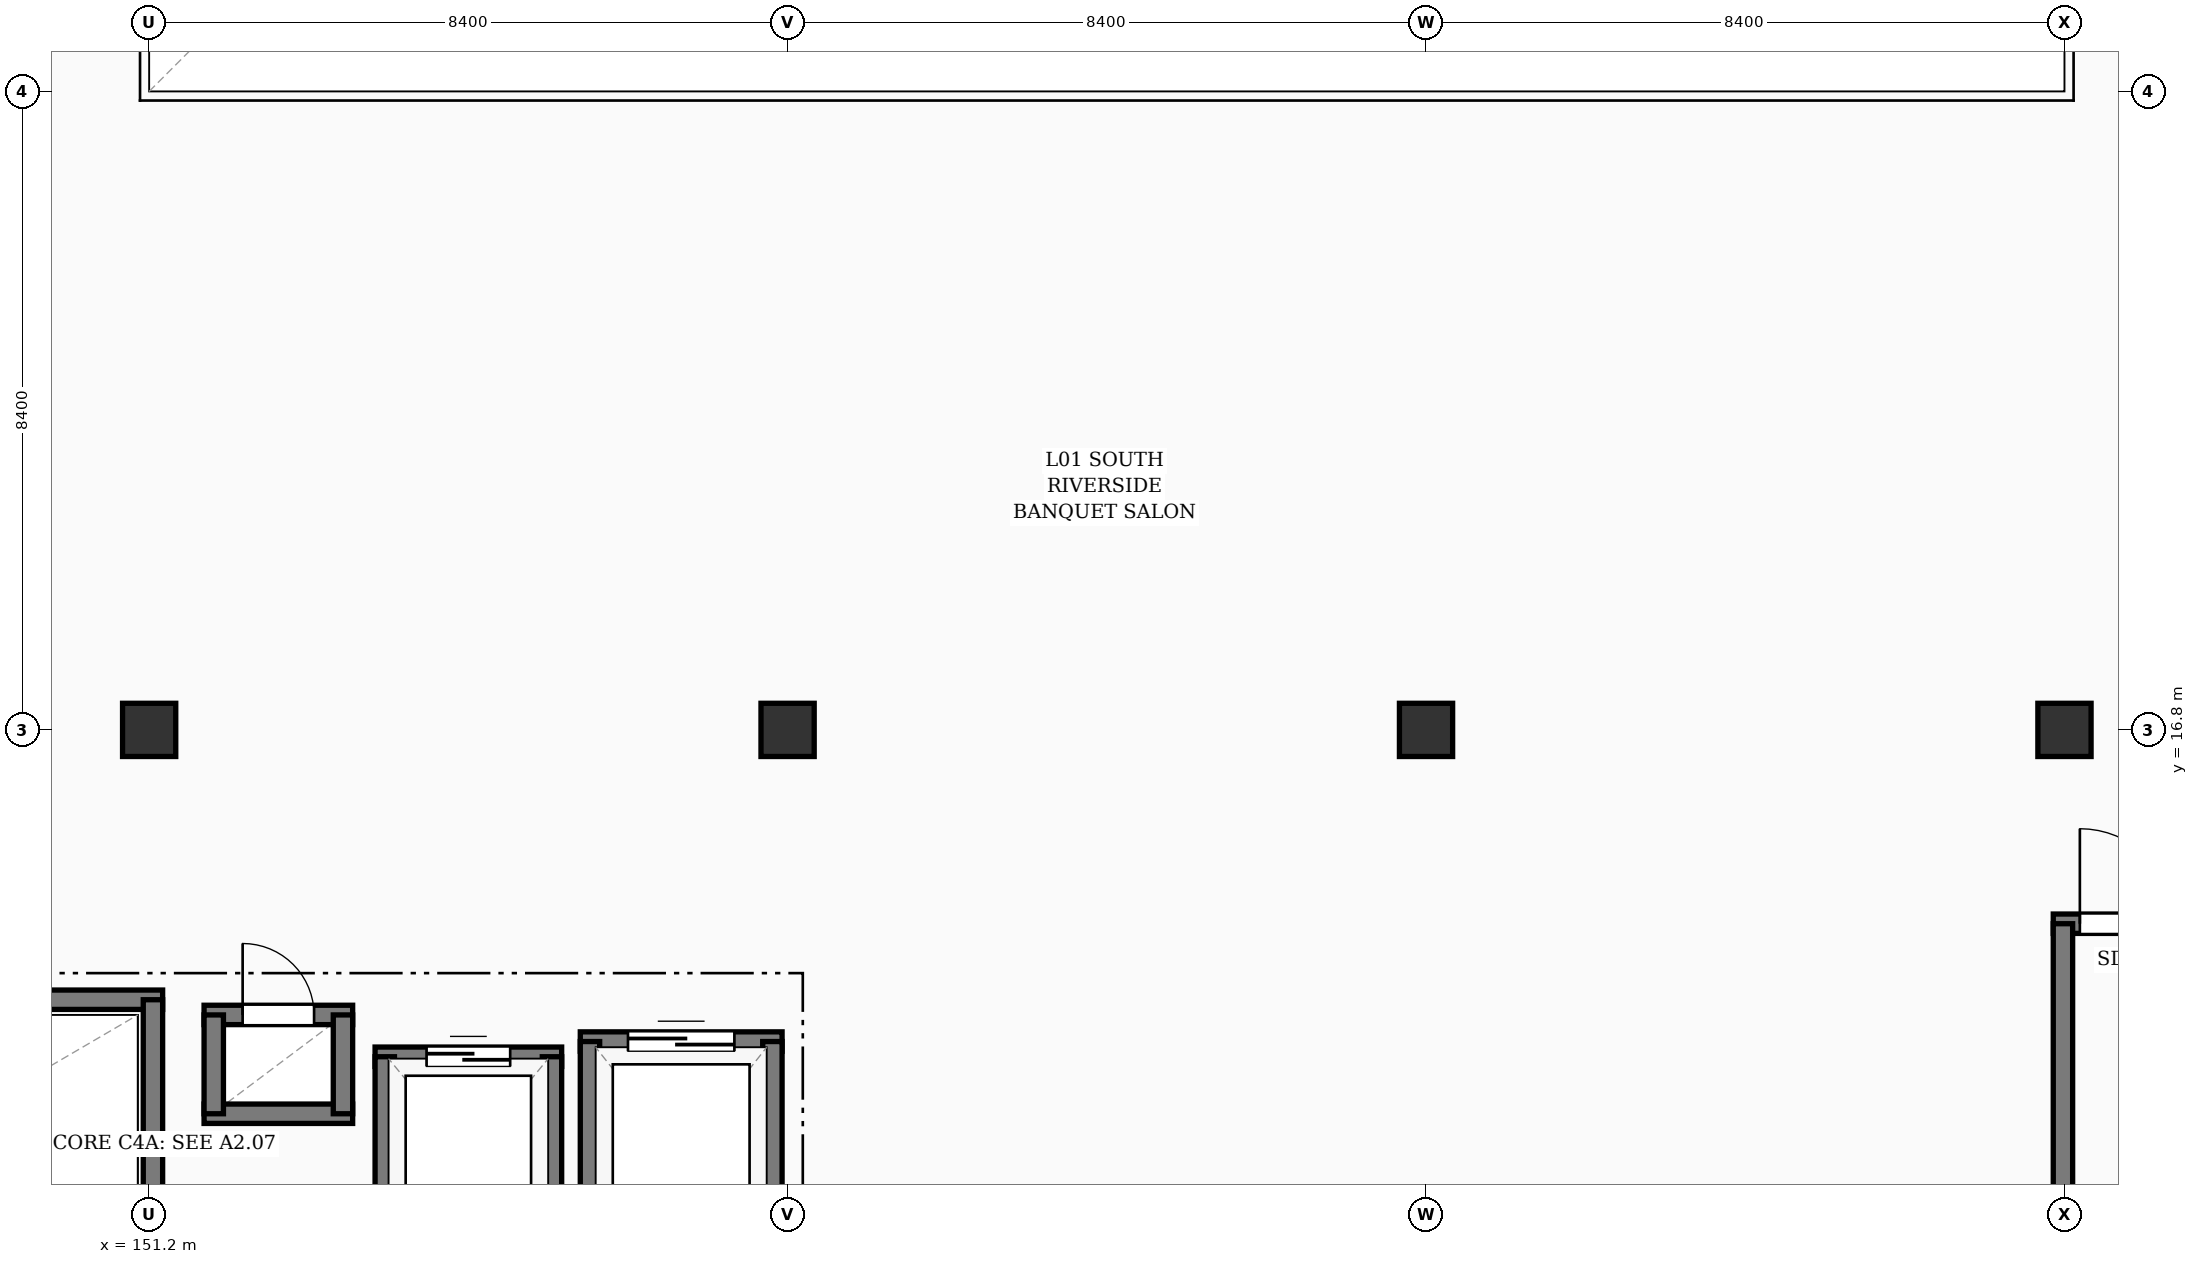
"""IFC4 building model, lengths in metres.
Left out: names, types, materials, properties, quantities, classifications, styles, units other than length and angle.
Written with IfcOpenShell. Run it as: python <this file> out.ifc"""

import sys

from ifc_helpers import new_model, si_unit, direction, frame, frame_2d, origin, origin_2d, place, context, subcontext, project, spatial, rectangle, extrude, element, fill, save


model = new_model("IFC4")
c1 = context("Model", 3, precision=1e-05, world=origin(), true_north=direction((0.0, 1.0)))
c2 = subcontext(c1, "Body", "Model", "MODEL_VIEW")
j1 = project(units=[si_unit("LENGTHUNIT", "METRE"), si_unit("PLANEANGLEUNIT", "RADIAN")], contexts=[c1])
p1 = place(None, origin())
s1 = spatial("IfcSite", under=j1, at=p1, CompositionType="ELEMENT")
p2 = place(p1, origin())
s2 = spatial("IfcBuilding", under=s1, at=p2, CompositionType="ELEMENT")
p3 = place(p2, frame((0.0, 0.0, 3.92)))
s3 = spatial("IfcBuildingStorey", under=s2, at=p3, CompositionType="ELEMENT", Elevation=3.92)
for number, where, z_axis, x_axis in (
    (1, (151.2, 16.8, 0.0), (0.0, 0.0, 1.0), (1.0, 0.0, 0.0)),
    (2, (159.6, 16.8, 0.0), (0.0, 0.0, 1.0), (1.0, 0.0, 0.0)),
    (3, (168.0, 16.8, 0.0), (0.0, 0.0, 1.0), (1.0, 0.0, 0.0)),
    (4, (176.4, 16.8, 0.0), (0.0, 0.0, 1.0), (1.0, 0.0, 0.0)),
):
    element("IfcColumn", number, at=place(p3, frame(where, z_axis=z_axis, x_axis=x_axis)), inside=s3, PredefinedType="COLUMN", context=c2, shape_type="SweptSolid", body=[
        extrude(rectangle(XDim=0.7, YDim=0.7, at=origin_2d()), origin(), (0.0, 0.0, 1.0), 3.64),
    ])
p4 = place(p3, frame((143.153, 13.25, 0.0), z_axis=(0.0, 0.0, 1.0), x_axis=(1.0, 0.0, 0.0)))
e5 = element("IfcWall", 5, at=p4, inside=s3, PredefinedType="SOLIDWALL", context=c2, shape_type="SweptSolid", body=[
    extrude(rectangle(XDim=8.225, YDim=0.255, at=frame_2d((4.112, 0.0))), origin(), (0.0, 0.0, 1.0), 3.36),
])
p5 = place(p4, frame((0.35, 0.0, 0.0)))
e6 = element("IfcOpeningElement", 6, at=p5, cuts=e5, PredefinedType="OPENING", context=c2, shape_type="SweptSolid", body=[
    extrude(rectangle(XDim=1.25, YDim=2.2, at=frame_2d((0.625, 1.1))), frame((0.0, 0.137, 0.0), z_axis=(0.0, -1.0, 0.0), x_axis=(1.0, 0.0, 0.0)), (0.0, 0.0, 1.0), 0.275),
])
p6 = place(p3, frame((151.25, 9.38, 0.0), z_axis=(0.0, 0.0, 1.0), x_axis=(0.0, 1.0, 0.0)))
e7 = element("IfcWall", 7, at=p6, inside=s3, PredefinedType="SOLIDWALL", context=c2, shape_type="SweptSolid", body=[
    extrude(rectangle(XDim=3.87, YDim=0.255, at=frame_2d((1.935, 0.0))), origin(), (0.0, 0.0, 1.0), 3.36),
])
p7 = place(p3, frame((176.252, 14.25, 0.0), z_axis=(0.0, 0.0, 1.0), x_axis=(1.0, 0.0, 0.0)))
e8 = element("IfcWall", 8, at=p7, inside=s3, PredefinedType="SOLIDWALL", context=c2, shape_type="SweptSolid", body=[
    extrude(rectangle(XDim=8.225, YDim=0.255, at=frame_2d((4.113, 0.0))), origin(), (0.0, 0.0, 1.0), 3.36),
])
p8 = place(p7, frame((0.35, 0.0, 0.0)))
e9 = element("IfcOpeningElement", 9, at=p8, cuts=e8, PredefinedType="OPENING", context=c2, shape_type="SweptSolid", body=[
    extrude(rectangle(XDim=1.25, YDim=2.2, at=frame_2d((0.625, 1.1))), frame((0.0, 0.137, 0.0), z_axis=(0.0, -1.0, 0.0), x_axis=(1.0, 0.0, 0.0)), (0.0, 0.0, 1.0), 0.275),
])
p9 = place(p3, frame((176.38, 10.38, 0.0), z_axis=(0.0, 0.0, 1.0), x_axis=(0.0, 1.0, 0.0)))
e10 = element("IfcWall", 10, at=p9, inside=s3, PredefinedType="SOLIDWALL", context=c2, shape_type="SweptSolid", body=[
    extrude(rectangle(XDim=3.87, YDim=0.255, at=frame_2d((1.935, 0.0))), origin(), (0.0, 0.0, 1.0), 3.36),
])
p10 = place(p3, frame((154.173, 12.5, 0.0), z_axis=(0.0, 0.0, 1.0), x_axis=(1.0, 0.0, 0.0)))
e11 = element("IfcWall", 11, at=p10, inside=s3, PredefinedType="SOLIDWALL", context=c2, shape_type="SweptSolid", body=[
    extrude(rectangle(XDim=2.455, YDim=0.255, at=frame_2d((1.228, 0.0))), origin(), (0.0, 0.0, 1.0), 3.36),
])
p11 = place(p10, frame((0.677, 0.0, 0.0)))
e12 = element("IfcOpeningElement", 12, at=p11, cuts=e11, PredefinedType="OPENING", context=c2, shape_type="SweptSolid", body=[
    extrude(rectangle(XDim=1.1, YDim=2.15, at=frame_2d((0.55, 1.075))), frame((0.0, 0.137, 0.0), z_axis=(0.0, -1.0, 0.0), x_axis=(1.0, 0.0, 0.0)), (0.0, 0.0, 1.0), 0.275),
])
for number, where, z_axis, x_axis in (
    (13, (154.3, 9.9, 0.0), (0.0, 0.0, 1.0), (0.0, 1.0, 0.0)),
    (14, (156.5, 9.9, 0.0), (0.0, 0.0, 1.0), (0.0, 1.0, 0.0)),
):
    element("IfcWall", number, at=place(p3, frame(where, z_axis=z_axis, x_axis=x_axis)), inside=s3, PredefinedType="SOLIDWALL", context=c2, shape_type="SweptSolid", body=[
        extrude(rectangle(XDim=2.6, YDim=0.255, at=frame_2d((1.3, 0.0))), origin(), (0.0, 0.0, 1.0), 3.36),
    ])
p12 = place(p3, frame((156.873, 12.7, 0.0), z_axis=(0.0, 0.0, 1.0), x_axis=(1.0, 0.0, 0.0)))
e15 = element("IfcWall", 15, at=p12, inside=s3, PredefinedType="SOLIDWALL", context=c2, shape_type="SweptSolid", body=[
    extrude(rectangle(XDim=2.655, YDim=0.255, at=frame_2d((1.328, 0.0))), origin(), (0.0, 0.0, 1.0), 3.36),
])
p13 = place(p12, frame((0.627, 0.0, 0.0)))
e16 = element("IfcOpeningElement", 16, at=p13, cuts=e15, PredefinedType="OPENING", context=c2, shape_type="SweptSolid", body=[
    extrude(rectangle(XDim=1.4, YDim=2.3, at=frame_2d((0.7, 1.15))), frame((0.0, 0.137, 0.0), z_axis=(0.0, -1.0, 0.0), x_axis=(1.0, 0.0, 0.0)), (0.0, 0.0, 1.0), 0.275),
])
for number, where, z_axis, x_axis in (
    (17, (157.0, 9.7, 0.0), (0.0, 0.0, 1.0), (0.0, 1.0, 0.0)),
    (18, (159.4, 9.7, 0.0), (0.0, 0.0, 1.0), (0.0, 1.0, 0.0)),
):
    element("IfcWall", number, at=place(p3, frame(where, z_axis=z_axis, x_axis=x_axis)), inside=s3, PredefinedType="SOLIDWALL", context=c2, shape_type="SweptSolid", body=[
        extrude(rectangle(XDim=3.0, YDim=0.255, at=frame_2d((1.5, 0.0))), origin(), (0.0, 0.0, 1.0), 3.36),
    ])
p14 = place(p3, frame((151.923, 11.75, 0.0), z_axis=(0.0, 0.0, 1.0), x_axis=(1.0, 0.0, 0.0)))
e19 = element("IfcWall", 19, at=p14, inside=s3, PredefinedType="SOLIDWALL", context=c2, shape_type="SweptSolid", body=[
    extrude(rectangle(XDim=1.955, YDim=0.255, at=frame_2d((0.978, 0.0))), origin(), (0.0, 0.0, 1.0), 3.36),
])
p15 = place(p3, frame((151.923, 13.05, 0.0), z_axis=(0.0, 0.0, 1.0), x_axis=(1.0, 0.0, 0.0)))
e20 = element("IfcWall", 20, at=p15, inside=s3, PredefinedType="SOLIDWALL", context=c2, shape_type="SweptSolid", body=[
    extrude(rectangle(XDim=1.955, YDim=0.255, at=frame_2d((0.978, 0.0))), origin(), (0.0, 0.0, 1.0), 3.36),
])
p16 = place(p15, frame((0.508, 0.0, 0.0)))
e21 = element("IfcOpeningElement", 21, at=p16, cuts=e20, PredefinedType="OPENING", context=c2, shape_type="SweptSolid", body=[
    extrude(rectangle(XDim=0.94, YDim=2.1, at=frame_2d((0.47, 1.05))), frame((0.0, 0.137, 0.0), z_axis=(0.0, -1.0, 0.0), x_axis=(1.0, 0.0, 0.0)), (0.0, 0.0, 1.0), 0.275),
])
for number, where, z_axis, x_axis in (
    (22, (152.05, 11.75, 0.0), (0.0, 0.0, 1.0), (0.0, 1.0, 0.0)),
    (23, (153.75, 11.75, 0.0), (0.0, 0.0, 1.0), (0.0, 1.0, 0.0)),
):
    element("IfcWall", number, at=place(p3, frame(where, z_axis=z_axis, x_axis=x_axis)), inside=s3, PredefinedType="SOLIDWALL", context=c2, shape_type="SweptSolid", body=[
        extrude(rectangle(XDim=1.3, YDim=0.255, at=frame_2d((0.65, 0.0))), origin(), (0.0, 0.0, 1.0), 3.36),
    ])
p17 = place(p8, origin())
e24 = element("IfcDoor", 24, at=p17, inside=s3, OperationType="SINGLE_SWING_LEFT", PredefinedType="DOOR", context=c2, shape_type="SweptSolid", body=[
    extrude(rectangle(XDim=1.25, YDim=2.2, at=frame_2d((0.625, 1.1))), frame((0.0, 0.025, 0.0), z_axis=(0.0, -1.0, 0.0), x_axis=(1.0, 0.0, 0.0)), (0.0, 0.0, 1.0), 0.05),
])
fill(e9, e24)
p18 = place(p11, origin())
e25 = element("IfcDoor", 25, at=p18, inside=s3, OperationType="DOUBLE_DOOR_SLIDING", PredefinedType="DOOR", context=c2, shape_type="SweptSolid", body=[
    extrude(rectangle(XDim=1.1, YDim=2.15, at=frame_2d((0.55, 1.075))), frame((0.0, 0.025, 0.0), z_axis=(0.0, -1.0, 0.0), x_axis=(1.0, 0.0, 0.0)), (0.0, 0.0, 1.0), 0.05),
])
fill(e12, e25)
p19 = place(p13, origin())
e26 = element("IfcDoor", 26, at=p19, inside=s3, OperationType="DOUBLE_DOOR_SLIDING", PredefinedType="DOOR", context=c2, shape_type="SweptSolid", body=[
    extrude(rectangle(XDim=1.4, YDim=2.3, at=frame_2d((0.7, 1.15))), frame((0.0, 0.025, 0.0), z_axis=(0.0, -1.0, 0.0), x_axis=(1.0, 0.0, 0.0)), (0.0, 0.0, 1.0), 0.05),
])
fill(e16, e26)
p20 = place(p16, origin())
e27 = element("IfcDoor", 27, at=p20, inside=s3, OperationType="SINGLE_SWING_LEFT", PredefinedType="DOOR", context=c2, shape_type="SweptSolid", body=[
    extrude(rectangle(XDim=0.94, YDim=2.1, at=frame_2d((0.47, 1.05))), frame((0.0, 0.025, 0.0), z_axis=(0.0, -1.0, 0.0), x_axis=(1.0, 0.0, 0.0)), (0.0, 0.0, 1.0), 0.05),
])
fill(e21, e27)
save(model, sys.argv[1])
